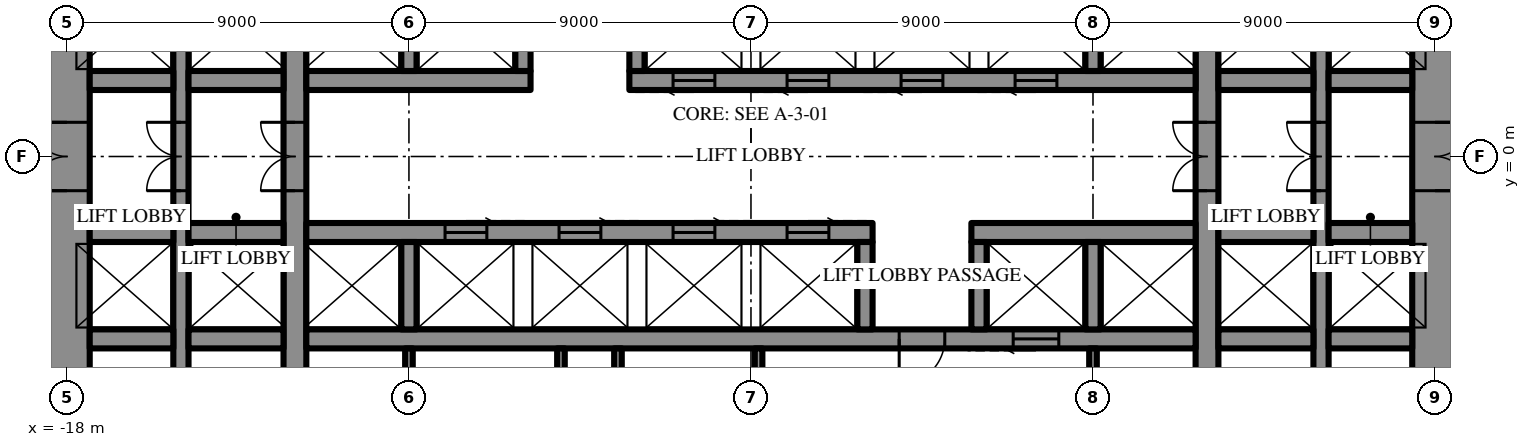
"""IFC4 building model, lengths in metres.
Left out: names, types, materials, properties, quantities, classifications, styles, units other than length and angle.
Written with IfcOpenShell. Run it as: python <this file> out.ifc"""

import sys

from ifc_helpers import new_model, si_unit, direction, frame, frame_2d, origin, place, context, subcontext, project, spatial, rectangle, extrude, element, fill, save


model = new_model("IFC4")
c1 = context("Model", 3, precision=1e-05, world=origin(), true_north=direction((0.0, 1.0)))
c2 = subcontext(c1, "Body", "Model", "MODEL_VIEW")
j1 = project(units=[si_unit("LENGTHUNIT", "METRE"), si_unit("PLANEANGLEUNIT", "RADIAN")], contexts=[c1])
p1 = place(None, origin())
s1 = spatial("IfcSite", under=j1, at=p1, CompositionType="ELEMENT")
p2 = place(p1, origin())
s2 = spatial("IfcBuilding", under=s1, at=p2, CompositionType="ELEMENT")
p3 = place(p2, frame((0.0, 0.0, 36.1)))
s3 = spatial("IfcBuildingStorey", under=s2, at=p3, CompositionType="ELEMENT", Elevation=36.1)
p4 = place(p3, frame((18.0, -10.7, 0.0), z_axis=(0.0, 0.0, 1.0), x_axis=(0.0, 1.0, 0.0)))
e1 = element("IfcWall", 1, at=p4, inside=s3, PredefinedType="SHEAR", context=c2, shape_type="SweptSolid", body=[
    extrude(rectangle(XDim=21.4, YDim=1.2, at=frame_2d((10.7, 0.0))), origin(), (0.0, 0.0, 1.0), 4.2),
])
p5 = place(p4, frame((9.8, 0.0, 0.0)))
e2 = element("IfcOpeningElement", 2, at=p5, cuts=e1, PredefinedType="OPENING", context=c2, shape_type="SweptSolid", body=[
    extrude(rectangle(XDim=1.8, YDim=2.4, at=frame_2d((0.9, 1.2))), frame((0.0, 0.61, 0.0), z_axis=(0.0, -1.0, 0.0), x_axis=(1.0, 0.0, 0.0)), (0.0, 0.0, 1.0), 1.22),
])
p6 = place(p3, frame((-18.0, 10.7, 0.0), z_axis=(0.0, 0.0, 1.0), x_axis=(0.0, -1.0, 0.0)))
e3 = element("IfcWall", 3, at=p6, inside=s3, PredefinedType="SHEAR", context=c2, shape_type="SweptSolid", body=[
    extrude(rectangle(XDim=21.4, YDim=1.2, at=frame_2d((10.7, 0.0))), origin(), (0.0, 0.0, 1.0), 4.2),
])
p7 = place(p6, frame((9.8, 0.0, 0.0)))
e4 = element("IfcOpeningElement", 4, at=p7, cuts=e3, PredefinedType="OPENING", context=c2, shape_type="SweptSolid", body=[
    extrude(rectangle(XDim=1.8, YDim=2.4, at=frame_2d((0.9, 1.2))), frame((0.0, 0.61, 0.0), z_axis=(0.0, -1.0, 0.0), x_axis=(1.0, 0.0, 0.0)), (0.0, 0.0, 1.0), 1.22),
])
p8 = place(p3, frame((12.0, -10.7, 0.0), z_axis=(0.0, 0.0, 1.0), x_axis=(0.0, 1.0, 0.0)))
e5 = element("IfcWall", 5, at=p8, inside=s3, PredefinedType="SHEAR", context=c2, shape_type="SweptSolid", body=[
    extrude(rectangle(XDim=21.4, YDim=0.6, at=frame_2d((10.7, 0.0))), origin(), (0.0, 0.0, 1.0), 4.2),
])
p9 = place(p8, frame((9.8, 0.0, 0.0)))
e6 = element("IfcOpeningElement", 6, at=p9, cuts=e5, PredefinedType="OPENING", context=c2, shape_type="SweptSolid", body=[
    extrude(rectangle(XDim=1.8, YDim=2.4, at=frame_2d((0.9, 1.2))), frame((0.0, 0.31, 0.0), z_axis=(0.0, -1.0, 0.0), x_axis=(1.0, 0.0, 0.0)), (0.0, 0.0, 1.0), 0.62),
])
p10 = place(p3, frame((-12.0, -10.7, 0.0), z_axis=(0.0, 0.0, 1.0), x_axis=(0.0, 1.0, 0.0)))
e7 = element("IfcWall", 7, at=p10, inside=s3, PredefinedType="SHEAR", context=c2, shape_type="SweptSolid", body=[
    extrude(rectangle(XDim=21.4, YDim=0.6, at=frame_2d((10.7, 0.0))), origin(), (0.0, 0.0, 1.0), 4.2),
])
p11 = place(p10, frame((9.8, 0.0, 0.0)))
e8 = element("IfcOpeningElement", 8, at=p11, cuts=e7, PredefinedType="OPENING", context=c2, shape_type="SweptSolid", body=[
    extrude(rectangle(XDim=1.8, YDim=2.4, at=frame_2d((0.9, 1.2))), frame((0.0, 0.31, 0.0), z_axis=(0.0, -1.0, 0.0), x_axis=(1.0, 0.0, 0.0)), (0.0, 0.0, 1.0), 0.62),
])
p12 = place(p3, frame((15.0, -10.7, 0.0), z_axis=(0.0, 0.0, 1.0), x_axis=(0.0, 1.0, 0.0)))
e9 = element("IfcWall", 9, at=p12, inside=s3, PredefinedType="SHEAR", context=c2, shape_type="SweptSolid", body=[
    extrude(rectangle(XDim=21.4, YDim=0.4, at=frame_2d((10.7, 0.0))), origin(), (0.0, 0.0, 1.0), 4.2),
])
p13 = place(p12, frame((9.8, 0.0, 0.0)))
e10 = element("IfcOpeningElement", 10, at=p13, cuts=e9, PredefinedType="OPENING", context=c2, shape_type="SweptSolid", body=[
    extrude(rectangle(XDim=1.8, YDim=2.4, at=frame_2d((0.9, 1.2))), frame((0.0, 0.21, 0.0), z_axis=(0.0, -1.0, 0.0), x_axis=(1.0, 0.0, 0.0)), (0.0, 0.0, 1.0), 0.42),
])
p14 = place(p3, frame((-15.0, -10.7, 0.0), z_axis=(0.0, 0.0, 1.0), x_axis=(0.0, 1.0, 0.0)))
e11 = element("IfcWall", 11, at=p14, inside=s3, PredefinedType="SHEAR", context=c2, shape_type="SweptSolid", body=[
    extrude(rectangle(XDim=21.4, YDim=0.4, at=frame_2d((10.7, 0.0))), origin(), (0.0, 0.0, 1.0), 4.2),
])
p15 = place(p14, frame((9.8, 0.0, 0.0)))
e12 = element("IfcOpeningElement", 12, at=p15, cuts=e11, PredefinedType="OPENING", context=c2, shape_type="SweptSolid", body=[
    extrude(rectangle(XDim=1.8, YDim=2.4, at=frame_2d((0.9, 1.2))), frame((0.0, 0.21, 0.0), z_axis=(0.0, -1.0, 0.0), x_axis=(1.0, 0.0, 0.0)), (0.0, 0.0, 1.0), 0.42),
])
p16 = place(p3, frame((-17.4, 2.0, 0.0), z_axis=(0.0, 0.0, 1.0), x_axis=(1.0, 0.0, 0.0)))
e13 = element("IfcWall", 13, at=p16, inside=s3, PredefinedType="SHEAR", context=c2, shape_type="SweptSolid", body=[
    extrude(rectangle(XDim=2.2, YDim=0.5, at=frame_2d((1.1, 0.0))), origin(), (0.0, 0.0, 1.0), 4.2),
])
p17 = place(p3, frame((-14.8, 2.0, 0.0), z_axis=(0.0, 0.0, 1.0), x_axis=(1.0, 0.0, 0.0)))
e14 = element("IfcWall", 14, at=p17, inside=s3, PredefinedType="SHEAR", context=c2, shape_type="SweptSolid", body=[
    extrude(rectangle(XDim=2.5, YDim=0.5, at=frame_2d((1.25, 0.0))), origin(), (0.0, 0.0, 1.0), 4.2),
])
p18 = place(p3, frame((-11.7, 2.0, 0.0), z_axis=(0.0, 0.0, 1.0), x_axis=(1.0, 0.0, 0.0)))
e15 = element("IfcWall", 15, at=p18, inside=s3, PredefinedType="SHEAR", context=c2, shape_type="SweptSolid", body=[
    extrude(rectangle(XDim=5.9, YDim=0.5, at=frame_2d((2.95, 0.0))), origin(), (0.0, 0.0, 1.0), 4.2),
])
p19 = place(p3, frame((-3.2, 2.0, 0.0), z_axis=(0.0, 0.0, 1.0), x_axis=(1.0, 0.0, 0.0)))
e16 = element("IfcWall", 16, at=p19, inside=s3, PredefinedType="SHEAR", context=c2, shape_type="SweptSolid", body=[
    extrude(rectangle(XDim=14.9, YDim=0.5, at=frame_2d((7.45, 0.0))), origin(), (0.0, 0.0, 1.0), 4.2),
])
p20 = place(p19, frame((1.15, 0.0, 0.0)))
e17 = element("IfcOpeningElement", 17, at=p20, cuts=e16, PredefinedType="OPENING", context=c2, shape_type="SweptSolid", body=[
    extrude(rectangle(XDim=1.1, YDim=2.2, at=frame_2d((0.55, 1.1))), frame((0.0, 0.26, 0.0), z_axis=(0.0, -1.0, 0.0), x_axis=(1.0, 0.0, 0.0)), (0.0, 0.0, 1.0), 0.52),
])
p21 = place(p19, frame((4.15, 0.0, 0.0)))
e18 = element("IfcOpeningElement", 18, at=p21, cuts=e16, PredefinedType="OPENING", context=c2, shape_type="SweptSolid", body=[
    extrude(rectangle(XDim=1.1, YDim=2.2, at=frame_2d((0.55, 1.1))), frame((0.0, 0.26, 0.0), z_axis=(0.0, -1.0, 0.0), x_axis=(1.0, 0.0, 0.0)), (0.0, 0.0, 1.0), 0.52),
])
p22 = place(p19, frame((7.15, 0.0, 0.0)))
e19 = element("IfcOpeningElement", 19, at=p22, cuts=e16, PredefinedType="OPENING", context=c2, shape_type="SweptSolid", body=[
    extrude(rectangle(XDim=1.1, YDim=2.2, at=frame_2d((0.55, 1.1))), frame((0.0, 0.26, 0.0), z_axis=(0.0, -1.0, 0.0), x_axis=(1.0, 0.0, 0.0)), (0.0, 0.0, 1.0), 0.52),
])
p23 = place(p19, frame((10.15, 0.0, 0.0)))
e20 = element("IfcOpeningElement", 20, at=p23, cuts=e16, PredefinedType="OPENING", context=c2, shape_type="SweptSolid", body=[
    extrude(rectangle(XDim=1.1, YDim=2.2, at=frame_2d((0.55, 1.1))), frame((0.0, 0.26, 0.0), z_axis=(0.0, -1.0, 0.0), x_axis=(1.0, 0.0, 0.0)), (0.0, 0.0, 1.0), 0.52),
])
p24 = place(p3, frame((12.3, 2.0, 0.0), z_axis=(0.0, 0.0, 1.0), x_axis=(1.0, 0.0, 0.0)))
e21 = element("IfcWall", 21, at=p24, inside=s3, PredefinedType="SHEAR", context=c2, shape_type="SweptSolid", body=[
    extrude(rectangle(XDim=2.5, YDim=0.5, at=frame_2d((1.25, 0.0))), origin(), (0.0, 0.0, 1.0), 4.2),
])
p25 = place(p3, frame((15.2, 2.0, 0.0), z_axis=(0.0, 0.0, 1.0), x_axis=(1.0, 0.0, 0.0)))
e22 = element("IfcWall", 22, at=p25, inside=s3, PredefinedType="SHEAR", context=c2, shape_type="SweptSolid", body=[
    extrude(rectangle(XDim=2.2, YDim=0.5, at=frame_2d((1.1, 0.0))), origin(), (0.0, 0.0, 1.0), 4.2),
])
for number, where, z_axis, x_axis in (
    (23, (-9.0, 2.25, 0.0), (0.0, 0.0, 1.0), (0.0, 1.0, 0.0)),
    (24, (-6.0, 2.25, 0.0), (0.0, 0.0, 1.0), (0.0, 1.0, 0.0)),
    (25, (-3.0, 2.25, 0.0), (0.0, 0.0, 1.0), (0.0, 1.0, 0.0)),
    (26, (9.0, 2.25, 0.0), (0.0, 0.0, 1.0), (0.0, 1.0, 0.0)),
):
    element("IfcWall", number, at=place(p3, frame(where, z_axis=z_axis, x_axis=x_axis)), inside=s3, PredefinedType="SHEAR", context=c2, shape_type="SweptSolid", body=[
        extrude(rectangle(XDim=2.3, YDim=0.4, at=frame_2d((1.15, 0.0))), origin(), (0.0, 0.0, 1.0), 4.2),
    ])
p26 = place(p3, frame((17.4, -2.0, 0.0), z_axis=(0.0, 0.0, 1.0), x_axis=(-1.0, 0.0, 0.0)))
e27 = element("IfcWall", 27, at=p26, inside=s3, PredefinedType="SHEAR", context=c2, shape_type="SweptSolid", body=[
    extrude(rectangle(XDim=2.2, YDim=0.5, at=frame_2d((1.1, 0.0))), origin(), (0.0, 0.0, 1.0), 4.2),
])
p27 = place(p3, frame((14.8, -2.0, 0.0), z_axis=(0.0, 0.0, 1.0), x_axis=(-1.0, 0.0, 0.0)))
e28 = element("IfcWall", 28, at=p27, inside=s3, PredefinedType="SHEAR", context=c2, shape_type="SweptSolid", body=[
    extrude(rectangle(XDim=2.5, YDim=0.5, at=frame_2d((1.25, 0.0))), origin(), (0.0, 0.0, 1.0), 4.2),
])
p28 = place(p3, frame((11.7, -2.0, 0.0), z_axis=(0.0, 0.0, 1.0), x_axis=(-1.0, 0.0, 0.0)))
e29 = element("IfcWall", 29, at=p28, inside=s3, PredefinedType="SHEAR", context=c2, shape_type="SweptSolid", body=[
    extrude(rectangle(XDim=5.9, YDim=0.5, at=frame_2d((2.95, 0.0))), origin(), (0.0, 0.0, 1.0), 4.2),
])
p29 = place(p3, frame((3.2, -2.0, 0.0), z_axis=(0.0, 0.0, 1.0), x_axis=(-1.0, 0.0, 0.0)))
e30 = element("IfcWall", 30, at=p29, inside=s3, PredefinedType="SHEAR", context=c2, shape_type="SweptSolid", body=[
    extrude(rectangle(XDim=14.9, YDim=0.5, at=frame_2d((7.45, 0.0))), origin(), (0.0, 0.0, 1.0), 4.2),
])
p30 = place(p29, frame((1.15, 0.0, 0.0)))
e31 = element("IfcOpeningElement", 31, at=p30, cuts=e30, PredefinedType="OPENING", context=c2, shape_type="SweptSolid", body=[
    extrude(rectangle(XDim=1.1, YDim=2.2, at=frame_2d((0.55, 1.1))), frame((0.0, 0.26, 0.0), z_axis=(0.0, -1.0, 0.0), x_axis=(1.0, 0.0, 0.0)), (0.0, 0.0, 1.0), 0.52),
])
p31 = place(p29, frame((4.15, 0.0, 0.0)))
e32 = element("IfcOpeningElement", 32, at=p31, cuts=e30, PredefinedType="OPENING", context=c2, shape_type="SweptSolid", body=[
    extrude(rectangle(XDim=1.1, YDim=2.2, at=frame_2d((0.55, 1.1))), frame((0.0, 0.26, 0.0), z_axis=(0.0, -1.0, 0.0), x_axis=(1.0, 0.0, 0.0)), (0.0, 0.0, 1.0), 0.52),
])
p32 = place(p29, frame((7.15, 0.0, 0.0)))
e33 = element("IfcOpeningElement", 33, at=p32, cuts=e30, PredefinedType="OPENING", context=c2, shape_type="SweptSolid", body=[
    extrude(rectangle(XDim=1.1, YDim=2.2, at=frame_2d((0.55, 1.1))), frame((0.0, 0.26, 0.0), z_axis=(0.0, -1.0, 0.0), x_axis=(1.0, 0.0, 0.0)), (0.0, 0.0, 1.0), 0.52),
])
p33 = place(p29, frame((10.15, 0.0, 0.0)))
e34 = element("IfcOpeningElement", 34, at=p33, cuts=e30, PredefinedType="OPENING", context=c2, shape_type="SweptSolid", body=[
    extrude(rectangle(XDim=1.1, YDim=2.2, at=frame_2d((0.55, 1.1))), frame((0.0, 0.26, 0.0), z_axis=(0.0, -1.0, 0.0), x_axis=(1.0, 0.0, 0.0)), (0.0, 0.0, 1.0), 0.52),
])
p34 = place(p3, frame((-12.3, -2.0, 0.0), z_axis=(0.0, 0.0, 1.0), x_axis=(-1.0, 0.0, 0.0)))
e35 = element("IfcWall", 35, at=p34, inside=s3, PredefinedType="SHEAR", context=c2, shape_type="SweptSolid", body=[
    extrude(rectangle(XDim=2.5, YDim=0.5, at=frame_2d((1.25, 0.0))), origin(), (0.0, 0.0, 1.0), 4.2),
])
for number, where, z_axis, x_axis in (
    (36, (-15.2, -2.0, 0.0), (0.0, 0.0, 1.0), (-1.0, 0.0, 0.0)),
    (37, (17.4, -4.8, 0.0), (0.0, 0.0, 1.0), (-1.0, 0.0, 0.0)),
):
    element("IfcWall", number, at=place(p3, frame(where, z_axis=z_axis, x_axis=x_axis)), inside=s3, PredefinedType="SHEAR", context=c2, shape_type="SweptSolid", body=[
        extrude(rectangle(XDim=2.2, YDim=0.5, at=frame_2d((1.1, 0.0))), origin(), (0.0, 0.0, 1.0), 4.2),
    ])
p35 = place(p3, frame((14.8, -4.8, 0.0), z_axis=(0.0, 0.0, 1.0), x_axis=(-1.0, 0.0, 0.0)))
e38 = element("IfcWall", 38, at=p35, inside=s3, PredefinedType="SHEAR", context=c2, shape_type="SweptSolid", body=[
    extrude(rectangle(XDim=2.5, YDim=0.5, at=frame_2d((1.25, 0.0))), origin(), (0.0, 0.0, 1.0), 4.2),
])
p36 = place(p3, frame((11.7, -4.8, 0.0), z_axis=(0.0, 0.0, 1.0), x_axis=(-1.0, 0.0, 0.0)))
e39 = element("IfcWall", 39, at=p36, inside=s3, PredefinedType="SHEAR", context=c2, shape_type="SweptSolid", body=[
    extrude(rectangle(XDim=23.4, YDim=0.5, at=frame_2d((11.7, 0.0))), origin(), (0.0, 0.0, 1.0), 4.2),
])
p37 = place(p36, frame((6.6, 0.0, 0.0)))
e40 = element("IfcOpeningElement", 40, at=p37, cuts=e39, PredefinedType="OPENING", context=c2, shape_type="SweptSolid", body=[
    extrude(rectangle(XDim=1.2, YDim=2.2, at=frame_2d((0.6, 1.1))), frame((0.0, 0.26, 0.0), z_axis=(0.0, -1.0, 0.0), x_axis=(1.0, 0.0, 0.0)), (0.0, 0.0, 1.0), 0.52),
])
p38 = place(p36, frame((3.6, 0.0, 0.0)))
e41 = element("IfcOpeningElement", 41, at=p38, cuts=e39, PredefinedType="OPENING", context=c2, shape_type="SweptSolid", body=[
    extrude(rectangle(XDim=1.2, YDim=2.2, at=frame_2d((0.6, 1.1))), frame((0.0, 0.26, 0.0), z_axis=(0.0, -1.0, 0.0), x_axis=(1.0, 0.0, 0.0)), (0.0, 0.0, 1.0), 0.52),
])
p39 = place(p3, frame((-12.3, -4.8, 0.0), z_axis=(0.0, 0.0, 1.0), x_axis=(-1.0, 0.0, 0.0)))
e42 = element("IfcWall", 42, at=p39, inside=s3, PredefinedType="SHEAR", context=c2, shape_type="SweptSolid", body=[
    extrude(rectangle(XDim=2.5, YDim=0.5, at=frame_2d((1.25, 0.0))), origin(), (0.0, 0.0, 1.0), 4.2),
])
p40 = place(p3, frame((-15.2, -4.8, 0.0), z_axis=(0.0, 0.0, 1.0), x_axis=(-1.0, 0.0, 0.0)))
e43 = element("IfcWall", 43, at=p40, inside=s3, PredefinedType="SHEAR", context=c2, shape_type="SweptSolid", body=[
    extrude(rectangle(XDim=2.2, YDim=0.5, at=frame_2d((1.1, 0.0))), origin(), (0.0, 0.0, 1.0), 4.2),
])
for number, where, z_axis, x_axis in (
    (44, (9.0, -2.25, 0.0), (0.0, 0.0, 1.0), (0.0, -1.0, 0.0)),
    (45, (6.0, -2.25, 0.0), (0.0, 0.0, 1.0), (0.0, -1.0, 0.0)),
    (46, (3.0, -2.25, 0.0), (0.0, 0.0, 1.0), (0.0, -1.0, 0.0)),
    (47, (-9.0, -2.25, 0.0), (0.0, 0.0, 1.0), (0.0, -1.0, 0.0)),
):
    element("IfcWall", number, at=place(p3, frame(where, z_axis=z_axis, x_axis=x_axis)), inside=s3, PredefinedType="SHEAR", context=c2, shape_type="SweptSolid", body=[
        extrude(rectangle(XDim=2.3, YDim=0.4, at=frame_2d((1.15, 0.0))), origin(), (0.0, 0.0, 1.0), 4.2),
    ])
p41 = place(p3, frame((0.2, -5.05, 0.0), z_axis=(0.0, 0.0, 1.0), x_axis=(0.0, -1.0, 0.0)))
e48 = element("IfcWall", 48, at=p41, inside=s3, PredefinedType="SHEAR", context=c2, shape_type="SweptSolid", body=[
    extrude(rectangle(XDim=5.65, YDim=0.2, at=frame_2d((2.825, 0.0))), origin(), (0.0, 0.0, 1.0), 4.2),
])
for number, where, z_axis, x_axis in (
    (49, (9.0, -5.05, 0.0), (0.0, 0.0, 1.0), (0.0, -1.0, 0.0)),
    (50, (-9.0, -5.05, 0.0), (0.0, 0.0, 1.0), (0.0, -1.0, 0.0)),
    (51, (-3.5, -5.05, 0.0), (0.0, 0.0, 1.0), (0.0, -1.0, 0.0)),
    (52, (-5.0, -5.05, 0.0), (0.0, 0.0, 1.0), (0.0, -1.0, 0.0)),
):
    element("IfcWall", number, at=place(p3, frame(where, z_axis=z_axis, x_axis=x_axis)), inside=s3, PredefinedType="PARTITIONING", context=c2, shape_type="SweptSolid", body=[
        extrude(rectangle(XDim=5.65, YDim=0.2, at=frame_2d((2.825, 0.0))), origin(), (0.0, 0.0, 1.0), 4.0),
    ])
p42 = place(p5, frame((1.8, 0.0, 0.0), z_axis=(0.0, 0.0, 1.0), x_axis=(-1.0, 0.0, 0.0)))
e53 = element("IfcDoor", 53, at=p42, inside=s3, OperationType="DOUBLE_DOOR_SINGLE_SWING", PredefinedType="DOOR", context=c2, shape_type="SweptSolid", body=[
    extrude(rectangle(XDim=1.8, YDim=2.4, at=frame_2d((0.9, 1.2))), frame((0.0, 0.025, 0.0), z_axis=(0.0, -1.0, 0.0), x_axis=(1.0, 0.0, 0.0)), (0.0, 0.0, 1.0), 0.05),
])
fill(e2, e53)
p43 = place(p7, frame((1.8, 0.0, 0.0), z_axis=(0.0, 0.0, 1.0), x_axis=(-1.0, 0.0, 0.0)))
e54 = element("IfcDoor", 54, at=p43, inside=s3, OperationType="DOUBLE_DOOR_SINGLE_SWING", PredefinedType="DOOR", context=c2, shape_type="SweptSolid", body=[
    extrude(rectangle(XDim=1.8, YDim=2.4, at=frame_2d((0.9, 1.2))), frame((0.0, 0.025, 0.0), z_axis=(0.0, -1.0, 0.0), x_axis=(1.0, 0.0, 0.0)), (0.0, 0.0, 1.0), 0.05),
])
fill(e4, e54)
p44 = place(p37, origin())
e55 = element("IfcDoor", 55, at=p44, inside=s3, OperationType="SINGLE_SWING_LEFT", PredefinedType="DOOR", context=c2, shape_type="SweptSolid", body=[
    extrude(rectangle(XDim=1.2, YDim=2.2, at=frame_2d((0.6, 1.1))), frame((0.0, 0.025, 0.0), z_axis=(0.0, -1.0, 0.0), x_axis=(1.0, 0.0, 0.0)), (0.0, 0.0, 1.0), 0.05),
])
fill(e40, e55)
p45 = place(p9, origin())
e56 = element("IfcDoor", 56, at=p45, inside=s3, OperationType="DOUBLE_DOOR_SINGLE_SWING", PredefinedType="DOOR", context=c2, shape_type="SweptSolid", body=[
    extrude(rectangle(XDim=1.8, YDim=2.4, at=frame_2d((0.9, 1.2))), frame((0.0, 0.025, 0.0), z_axis=(0.0, -1.0, 0.0), x_axis=(1.0, 0.0, 0.0)), (0.0, 0.0, 1.0), 0.05),
])
fill(e6, e56)
p46 = place(p11, origin())
e57 = element("IfcDoor", 57, at=p46, inside=s3, OperationType="DOUBLE_DOOR_SINGLE_SWING", PredefinedType="DOOR", context=c2, shape_type="SweptSolid", body=[
    extrude(rectangle(XDim=1.8, YDim=2.4, at=frame_2d((0.9, 1.2))), frame((0.0, 0.025, 0.0), z_axis=(0.0, -1.0, 0.0), x_axis=(1.0, 0.0, 0.0)), (0.0, 0.0, 1.0), 0.05),
])
fill(e8, e57)
p47 = place(p13, origin())
e58 = element("IfcDoor", 58, at=p47, inside=s3, OperationType="DOUBLE_DOOR_SINGLE_SWING", PredefinedType="DOOR", context=c2, shape_type="SweptSolid", body=[
    extrude(rectangle(XDim=1.8, YDim=2.4, at=frame_2d((0.9, 1.2))), frame((0.0, 0.025, 0.0), z_axis=(0.0, -1.0, 0.0), x_axis=(1.0, 0.0, 0.0)), (0.0, 0.0, 1.0), 0.05),
])
fill(e10, e58)
p48 = place(p15, origin())
e59 = element("IfcDoor", 59, at=p48, inside=s3, OperationType="DOUBLE_DOOR_SINGLE_SWING", PredefinedType="DOOR", context=c2, shape_type="SweptSolid", body=[
    extrude(rectangle(XDim=1.8, YDim=2.4, at=frame_2d((0.9, 1.2))), frame((0.0, 0.025, 0.0), z_axis=(0.0, -1.0, 0.0), x_axis=(1.0, 0.0, 0.0)), (0.0, 0.0, 1.0), 0.05),
])
fill(e12, e59)
p49 = place(p20, frame((1.1, 0.0, 0.0), z_axis=(0.0, 0.0, 1.0), x_axis=(-1.0, 0.0, 0.0)))
e60 = element("IfcDoor", 60, at=p49, inside=s3, OperationType="SLIDING_TO_LEFT", PredefinedType="DOOR", context=c2, shape_type="SweptSolid", body=[
    extrude(rectangle(XDim=1.1, YDim=2.2, at=frame_2d((0.55, 1.1))), frame((0.0, 0.025, 0.0), z_axis=(0.0, -1.0, 0.0), x_axis=(1.0, 0.0, 0.0)), (0.0, 0.0, 1.0), 0.05),
])
fill(e17, e60)
p50 = place(p21, frame((1.1, 0.0, 0.0), z_axis=(0.0, 0.0, 1.0), x_axis=(-1.0, 0.0, 0.0)))
e61 = element("IfcDoor", 61, at=p50, inside=s3, OperationType="SLIDING_TO_LEFT", PredefinedType="DOOR", context=c2, shape_type="SweptSolid", body=[
    extrude(rectangle(XDim=1.1, YDim=2.2, at=frame_2d((0.55, 1.1))), frame((0.0, 0.025, 0.0), z_axis=(0.0, -1.0, 0.0), x_axis=(1.0, 0.0, 0.0)), (0.0, 0.0, 1.0), 0.05),
])
fill(e18, e61)
p51 = place(p22, frame((1.1, 0.0, 0.0), z_axis=(0.0, 0.0, 1.0), x_axis=(-1.0, 0.0, 0.0)))
e62 = element("IfcDoor", 62, at=p51, inside=s3, OperationType="SLIDING_TO_LEFT", PredefinedType="DOOR", context=c2, shape_type="SweptSolid", body=[
    extrude(rectangle(XDim=1.1, YDim=2.2, at=frame_2d((0.55, 1.1))), frame((0.0, 0.025, 0.0), z_axis=(0.0, -1.0, 0.0), x_axis=(1.0, 0.0, 0.0)), (0.0, 0.0, 1.0), 0.05),
])
fill(e19, e62)
p52 = place(p23, frame((1.1, 0.0, 0.0), z_axis=(0.0, 0.0, 1.0), x_axis=(-1.0, 0.0, 0.0)))
e63 = element("IfcDoor", 63, at=p52, inside=s3, OperationType="SLIDING_TO_LEFT", PredefinedType="DOOR", context=c2, shape_type="SweptSolid", body=[
    extrude(rectangle(XDim=1.1, YDim=2.2, at=frame_2d((0.55, 1.1))), frame((0.0, 0.025, 0.0), z_axis=(0.0, -1.0, 0.0), x_axis=(1.0, 0.0, 0.0)), (0.0, 0.0, 1.0), 0.05),
])
fill(e20, e63)
p53 = place(p38, origin())
e64 = element("IfcDoor", 64, at=p53, inside=s3, OperationType="SLIDING_TO_LEFT", PredefinedType="DOOR", context=c2, shape_type="SweptSolid", body=[
    extrude(rectangle(XDim=1.2, YDim=2.2, at=frame_2d((0.6, 1.1))), frame((0.0, 0.025, 0.0), z_axis=(0.0, -1.0, 0.0), x_axis=(1.0, 0.0, 0.0)), (0.0, 0.0, 1.0), 0.05),
])
fill(e41, e64)
p54 = place(p30, frame((1.1, 0.0, 0.0), z_axis=(0.0, 0.0, 1.0), x_axis=(-1.0, 0.0, 0.0)))
e65 = element("IfcDoor", 65, at=p54, inside=s3, OperationType="SLIDING_TO_LEFT", PredefinedType="DOOR", context=c2, shape_type="SweptSolid", body=[
    extrude(rectangle(XDim=1.1, YDim=2.2, at=frame_2d((0.55, 1.1))), frame((0.0, 0.025, 0.0), z_axis=(0.0, -1.0, 0.0), x_axis=(1.0, 0.0, 0.0)), (0.0, 0.0, 1.0), 0.05),
])
fill(e31, e65)
p55 = place(p31, frame((1.1, 0.0, 0.0), z_axis=(0.0, 0.0, 1.0), x_axis=(-1.0, 0.0, 0.0)))
e66 = element("IfcDoor", 66, at=p55, inside=s3, OperationType="SLIDING_TO_LEFT", PredefinedType="DOOR", context=c2, shape_type="SweptSolid", body=[
    extrude(rectangle(XDim=1.1, YDim=2.2, at=frame_2d((0.55, 1.1))), frame((0.0, 0.025, 0.0), z_axis=(0.0, -1.0, 0.0), x_axis=(1.0, 0.0, 0.0)), (0.0, 0.0, 1.0), 0.05),
])
fill(e32, e66)
p56 = place(p32, frame((1.1, 0.0, 0.0), z_axis=(0.0, 0.0, 1.0), x_axis=(-1.0, 0.0, 0.0)))
e67 = element("IfcDoor", 67, at=p56, inside=s3, OperationType="SLIDING_TO_LEFT", PredefinedType="DOOR", context=c2, shape_type="SweptSolid", body=[
    extrude(rectangle(XDim=1.1, YDim=2.2, at=frame_2d((0.55, 1.1))), frame((0.0, 0.025, 0.0), z_axis=(0.0, -1.0, 0.0), x_axis=(1.0, 0.0, 0.0)), (0.0, 0.0, 1.0), 0.05),
])
fill(e33, e67)
p57 = place(p33, frame((1.1, 0.0, 0.0), z_axis=(0.0, 0.0, 1.0), x_axis=(-1.0, 0.0, 0.0)))
e68 = element("IfcDoor", 68, at=p57, inside=s3, OperationType="SLIDING_TO_LEFT", PredefinedType="DOOR", context=c2, shape_type="SweptSolid", body=[
    extrude(rectangle(XDim=1.1, YDim=2.2, at=frame_2d((0.55, 1.1))), frame((0.0, 0.025, 0.0), z_axis=(0.0, -1.0, 0.0), x_axis=(1.0, 0.0, 0.0)), (0.0, 0.0, 1.0), 0.05),
])
fill(e34, e68)
save(model, sys.argv[1])
